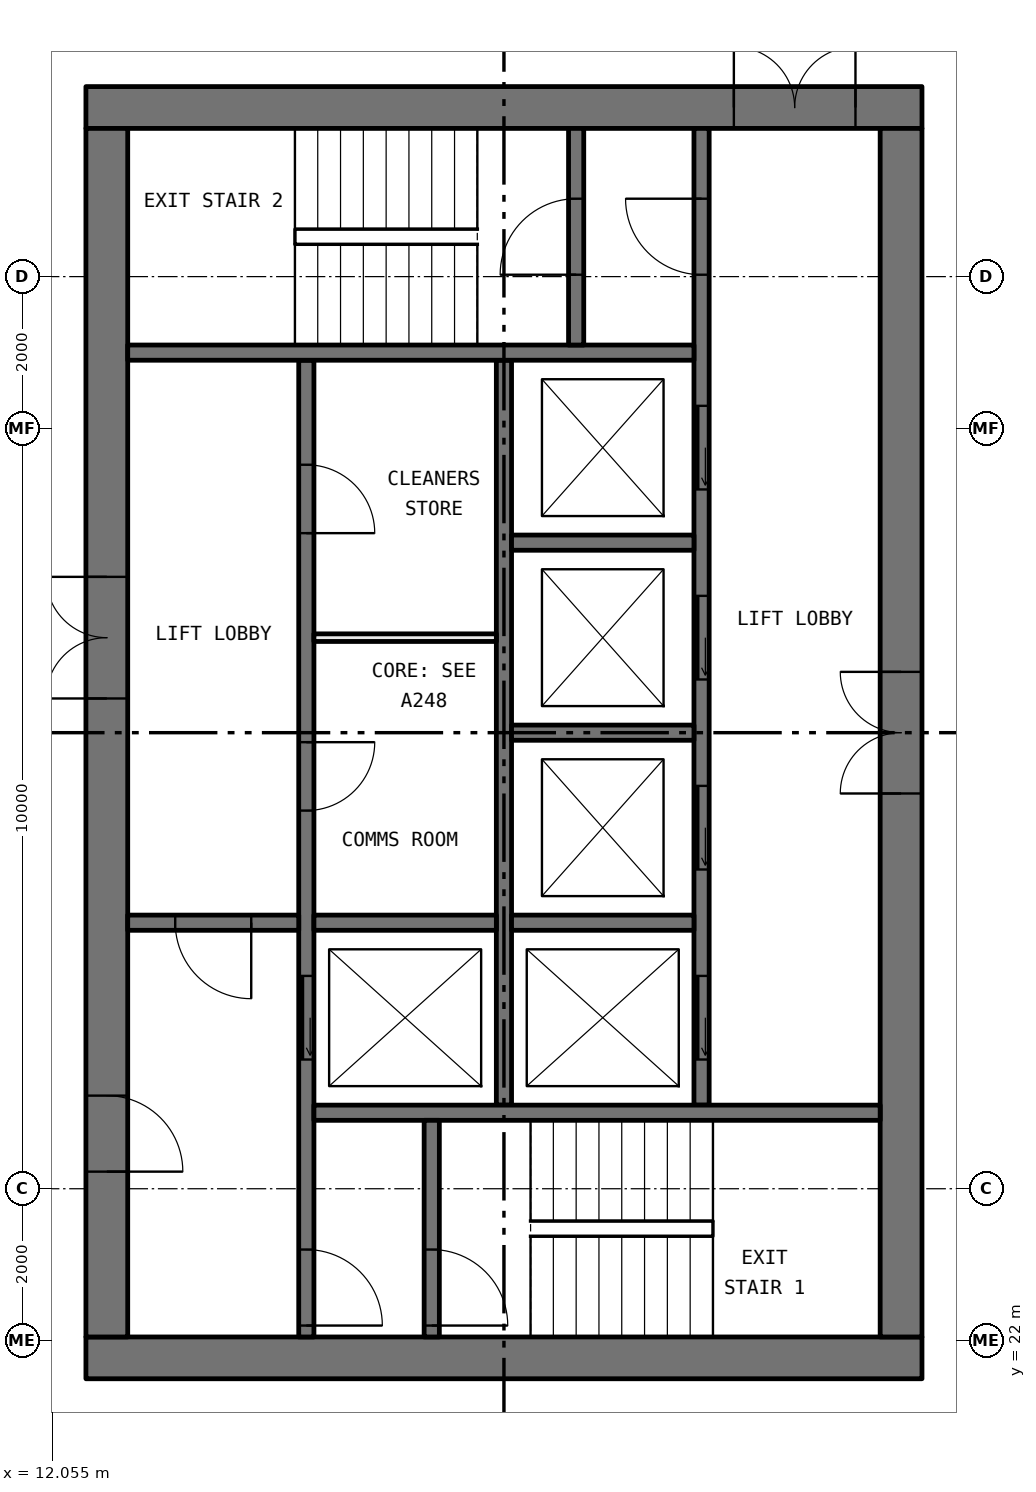
"""IFC4 building model, lengths in metres.
Left out: names, types, materials, properties, quantities, classifications, styles, units other than length and angle.
Written with IfcOpenShell. Run it as: python <this file> out.ifc"""

import sys

from ifc_helpers import new_model, si_unit, direction, frame, frame_2d, origin, place, context, subcontext, project, spatial, rectangle, extrude, element, fill, save


model = new_model("IFC4")
c1 = context("Model", 3, precision=1e-05, world=origin(), true_north=direction((0.0, 1.0)))
c2 = subcontext(c1, "Body", "Model", "MODEL_VIEW")
j1 = project(units=[si_unit("LENGTHUNIT", "METRE"), si_unit("PLANEANGLEUNIT", "RADIAN")], contexts=[c1])
p1 = place(None, origin())
s1 = spatial("IfcSite", under=j1, at=p1, CompositionType="ELEMENT")
p2 = place(p1, origin())
s2 = spatial("IfcBuilding", under=s1, at=p2, CompositionType="ELEMENT")
p3 = place(p2, frame((0.0, 0.0, 178.95)))
s3 = spatial("IfcBuildingStorey", under=s2, at=p3, CompositionType="ELEMENT", Elevation=178.95)
p4 = place(p3, frame((12.5, 21.775, 0.0), z_axis=(0.0, 0.0, 1.0), x_axis=(1.0, 0.0, 0.0)))
e1 = element("IfcWall", 1, at=p4, inside=s3, PredefinedType="SHEAR", context=c2, shape_type="SweptSolid", body=[
    extrude(rectangle(XDim=11.0, YDim=0.55, at=frame_2d((5.5, 0.0))), origin(), (0.0, 0.0, 1.0), 3.05),
])
p5 = place(p3, frame((12.5, 38.225, 0.0), z_axis=(0.0, 0.0, 1.0), x_axis=(1.0, 0.0, 0.0)))
e2 = element("IfcWall", 2, at=p5, inside=s3, PredefinedType="SHEAR", context=c2, shape_type="SweptSolid", body=[
    extrude(rectangle(XDim=11.0, YDim=0.55, at=frame_2d((5.5, 0.0))), origin(), (0.0, 0.0, 1.0), 3.05),
])
p6 = place(p5, frame((8.525, 0.0, 0.0)))
e3 = element("IfcOpeningElement", 3, at=p6, cuts=e2, PredefinedType="OPENING", context=c2, shape_type="SweptSolid", body=[
    extrude(rectangle(XDim=1.6, YDim=2.1, at=frame_2d((0.8, 1.05))), frame((0.0, 0.285, 0.0), z_axis=(0.0, -1.0, 0.0), x_axis=(1.0, 0.0, 0.0)), (0.0, 0.0, 1.0), 0.57),
])
p7 = place(p3, frame((12.775, 22.05, 0.0), z_axis=(0.0, 0.0, 1.0), x_axis=(0.0, 1.0, 0.0)))
e4 = element("IfcWall", 4, at=p7, inside=s3, PredefinedType="SHEAR", context=c2, shape_type="SweptSolid", body=[
    extrude(rectangle(XDim=15.9, YDim=0.55, at=frame_2d((7.95, 0.0))), origin(), (0.0, 0.0, 1.0), 3.05),
])
p8 = place(p7, frame((8.4, 0.0, 0.0)))
e5 = element("IfcOpeningElement", 5, at=p8, cuts=e4, PredefinedType="OPENING", context=c2, shape_type="SweptSolid", body=[
    extrude(rectangle(XDim=1.6, YDim=2.1, at=frame_2d((0.8, 1.05))), frame((0.0, 0.285, 0.0), z_axis=(0.0, -1.0, 0.0), x_axis=(1.0, 0.0, 0.0)), (0.0, 0.0, 1.0), 0.57),
])
p9 = place(p7, frame((2.175, 0.0, 0.0)))
e6 = element("IfcOpeningElement", 6, at=p9, cuts=e4, PredefinedType="OPENING", context=c2, shape_type="SweptSolid", body=[
    extrude(rectangle(XDim=1.0, YDim=2.1, at=frame_2d((0.5, 1.05))), frame((0.0, 0.285, 0.0), z_axis=(0.0, -1.0, 0.0), x_axis=(1.0, 0.0, 0.0)), (0.0, 0.0, 1.0), 0.57),
])
p10 = place(p3, frame((23.225, 22.05, 0.0), z_axis=(0.0, 0.0, 1.0), x_axis=(0.0, 1.0, 0.0)))
e7 = element("IfcWall", 7, at=p10, inside=s3, PredefinedType="SHEAR", context=c2, shape_type="SweptSolid", body=[
    extrude(rectangle(XDim=15.9, YDim=0.55, at=frame_2d((7.95, 0.0))), origin(), (0.0, 0.0, 1.0), 3.05),
])
p11 = place(p10, frame((7.15, 0.0, 0.0)))
e8 = element("IfcOpeningElement", 8, at=p11, cuts=e7, PredefinedType="OPENING", context=c2, shape_type="SweptSolid", body=[
    extrude(rectangle(XDim=1.6, YDim=2.1, at=frame_2d((0.8, 1.05))), frame((0.0, 0.285, 0.0), z_axis=(0.0, -1.0, 0.0), x_axis=(1.0, 0.0, 0.0)), (0.0, 0.0, 1.0), 0.57),
])
p12 = place(p3, frame((15.4, 22.05, 0.0), z_axis=(0.0, 0.0, 1.0), x_axis=(0.0, 1.0, 0.0)))
e9 = element("IfcWall", 9, at=p12, inside=s3, PredefinedType="SOLIDWALL", context=c2, shape_type="SweptSolid", body=[
    extrude(rectangle(XDim=12.85, YDim=0.2, at=frame_2d((6.425, 0.0))), origin(), (0.0, 0.0, 1.0), 3.05),
])
p13 = place(p12, frame((3.65, 0.0, 0.0)))
e10 = element("IfcOpeningElement", 10, at=p13, cuts=e9, PredefinedType="OPENING", context=c2, shape_type="SweptSolid", body=[
    extrude(rectangle(XDim=1.1, YDim=2.1, at=frame_2d((0.55, 1.05))), frame((0.0, 0.11, 0.0), z_axis=(0.0, -1.0, 0.0), x_axis=(1.0, 0.0, 0.0)), (0.0, 0.0, 1.0), 0.22),
])
p14 = place(p12, frame((0.15, 0.0, 0.0)))
e11 = element("IfcOpeningElement", 11, at=p14, cuts=e9, PredefinedType="OPENING", context=c2, shape_type="SweptSolid", body=[
    extrude(rectangle(XDim=1.0, YDim=2.1, at=frame_2d((0.5, 1.05))), frame((0.0, 0.11, 0.0), z_axis=(0.0, -1.0, 0.0), x_axis=(1.0, 0.0, 0.0)), (0.0, 0.0, 1.0), 0.22),
])
p15 = place(p12, frame((6.925, 0.0, 0.0)))
e12 = element("IfcOpeningElement", 12, at=p15, cuts=e9, PredefinedType="OPENING", context=c2, shape_type="SweptSolid", body=[
    extrude(rectangle(XDim=0.9, YDim=2.1, at=frame_2d((0.45, 1.05))), frame((0.0, 0.11, 0.0), z_axis=(0.0, -1.0, 0.0), x_axis=(1.0, 0.0, 0.0)), (0.0, 0.0, 1.0), 0.22),
])
p16 = place(p12, frame((10.575, 0.0, 0.0)))
e13 = element("IfcOpeningElement", 13, at=p16, cuts=e9, PredefinedType="OPENING", context=c2, shape_type="SweptSolid", body=[
    extrude(rectangle(XDim=0.9, YDim=2.1, at=frame_2d((0.45, 1.05))), frame((0.0, 0.11, 0.0), z_axis=(0.0, -1.0, 0.0), x_axis=(1.0, 0.0, 0.0)), (0.0, 0.0, 1.0), 0.22),
])
p17 = place(p3, frame((20.6, 25.1, 0.0), z_axis=(0.0, 0.0, 1.0), x_axis=(0.0, 1.0, 0.0)))
e14 = element("IfcWall", 14, at=p17, inside=s3, PredefinedType="SOLIDWALL", context=c2, shape_type="SweptSolid", body=[
    extrude(rectangle(XDim=12.85, YDim=0.2, at=frame_2d((6.425, 0.0))), origin(), (0.0, 0.0, 1.0), 3.05),
])
p18 = place(p17, frame((0.6, 0.0, 0.0)))
e15 = element("IfcOpeningElement", 15, at=p18, cuts=e14, PredefinedType="OPENING", context=c2, shape_type="SweptSolid", body=[
    extrude(rectangle(XDim=1.1, YDim=2.1, at=frame_2d((0.55, 1.05))), frame((0.0, 0.11, 0.0), z_axis=(0.0, -1.0, 0.0), x_axis=(1.0, 0.0, 0.0)), (0.0, 0.0, 1.0), 0.22),
])
p19 = place(p17, frame((3.1, 0.0, 0.0)))
e16 = element("IfcOpeningElement", 16, at=p19, cuts=e14, PredefinedType="OPENING", context=c2, shape_type="SweptSolid", body=[
    extrude(rectangle(XDim=1.1, YDim=2.1, at=frame_2d((0.55, 1.05))), frame((0.0, 0.11, 0.0), z_axis=(0.0, -1.0, 0.0), x_axis=(1.0, 0.0, 0.0)), (0.0, 0.0, 1.0), 0.22),
])
p20 = place(p17, frame((5.6, 0.0, 0.0)))
e17 = element("IfcOpeningElement", 17, at=p20, cuts=e14, PredefinedType="OPENING", context=c2, shape_type="SweptSolid", body=[
    extrude(rectangle(XDim=1.1, YDim=2.1, at=frame_2d((0.55, 1.05))), frame((0.0, 0.11, 0.0), z_axis=(0.0, -1.0, 0.0), x_axis=(1.0, 0.0, 0.0)), (0.0, 0.0, 1.0), 0.22),
])
p21 = place(p17, frame((8.1, 0.0, 0.0)))
e18 = element("IfcOpeningElement", 18, at=p21, cuts=e14, PredefinedType="OPENING", context=c2, shape_type="SweptSolid", body=[
    extrude(rectangle(XDim=1.1, YDim=2.1, at=frame_2d((0.55, 1.05))), frame((0.0, 0.11, 0.0), z_axis=(0.0, -1.0, 0.0), x_axis=(1.0, 0.0, 0.0)), (0.0, 0.0, 1.0), 0.22),
])
p22 = place(p17, frame((10.925, 0.0, 0.0)))
e19 = element("IfcOpeningElement", 19, at=p22, cuts=e14, PredefinedType="OPENING", context=c2, shape_type="SweptSolid", body=[
    extrude(rectangle(XDim=1.0, YDim=2.1, at=frame_2d((0.5, 1.05))), frame((0.0, 0.11, 0.0), z_axis=(0.0, -1.0, 0.0), x_axis=(1.0, 0.0, 0.0)), (0.0, 0.0, 1.0), 0.22),
])
p23 = place(p3, frame((18.0, 25.1, 0.0), z_axis=(0.0, 0.0, 1.0), x_axis=(0.0, 1.0, 0.0)))
e20 = element("IfcWall", 20, at=p23, inside=s3, PredefinedType="SOLIDWALL", context=c2, shape_type="SweptSolid", body=[
    extrude(rectangle(XDim=9.8, YDim=0.2, at=frame_2d((4.9, 0.0))), origin(), (0.0, 0.0, 1.0), 3.05),
])
for number, where, z_axis, x_axis in (
    (21, (15.5, 25.0, 0.0), (0.0, 0.0, 1.0), (1.0, 0.0, 0.0)),
    (22, (13.05, 35.0, 0.0), (0.0, 0.0, 1.0), (1.0, 0.0, 0.0)),
):
    element("IfcWall", number, at=place(p3, frame(where, z_axis=z_axis, x_axis=x_axis)), inside=s3, PredefinedType="SOLIDWALL", context=c2, shape_type="SweptSolid", body=[
        extrude(rectangle(XDim=7.45, YDim=0.2, at=frame_2d((3.725, 0.0))), origin(), (0.0, 0.0, 1.0), 3.05),
    ])
p24 = place(p3, frame((13.05, 27.5, 0.0), z_axis=(0.0, 0.0, 1.0), x_axis=(1.0, 0.0, 0.0)))
e23 = element("IfcWall", 23, at=p24, inside=s3, PredefinedType="SOLIDWALL", context=c2, shape_type="SweptSolid", body=[
    extrude(rectangle(XDim=2.25, YDim=0.2, at=frame_2d((1.125, 0.0))), origin(), (0.0, 0.0, 1.0), 3.05),
])
p25 = place(p24, frame((0.625, 0.0, 0.0)))
e24 = element("IfcOpeningElement", 24, at=p25, cuts=e23, PredefinedType="OPENING", context=c2, shape_type="SweptSolid", body=[
    extrude(rectangle(XDim=1.0, YDim=2.1, at=frame_2d((0.5, 1.05))), frame((0.0, 0.11, 0.0), z_axis=(0.0, -1.0, 0.0), x_axis=(1.0, 0.0, 0.0)), (0.0, 0.0, 1.0), 0.22),
])
p26 = place(p3, frame((17.05, 22.05, 0.0), z_axis=(0.0, 0.0, 1.0), x_axis=(0.0, 1.0, 0.0)))
e25 = element("IfcWall", 25, at=p26, inside=s3, PredefinedType="SOLIDWALL", context=c2, shape_type="SweptSolid", body=[
    extrude(rectangle(XDim=2.85, YDim=0.2, at=frame_2d((1.425, 0.0))), origin(), (0.0, 0.0, 1.0), 3.05),
])
p27 = place(p26, frame((0.15, 0.0, 0.0)))
e26 = element("IfcOpeningElement", 26, at=p27, cuts=e25, PredefinedType="OPENING", context=c2, shape_type="SweptSolid", body=[
    extrude(rectangle(XDim=1.0, YDim=2.1, at=frame_2d((0.5, 1.05))), frame((0.0, 0.11, 0.0), z_axis=(0.0, -1.0, 0.0), x_axis=(1.0, 0.0, 0.0)), (0.0, 0.0, 1.0), 0.22),
])
p28 = place(p3, frame((18.95, 35.1, 0.0), z_axis=(0.0, 0.0, 1.0), x_axis=(0.0, 1.0, 0.0)))
e27 = element("IfcWall", 27, at=p28, inside=s3, PredefinedType="SOLIDWALL", context=c2, shape_type="SweptSolid", body=[
    extrude(rectangle(XDim=2.85, YDim=0.2, at=frame_2d((1.425, 0.0))), origin(), (0.0, 0.0, 1.0), 3.05),
])
p29 = place(p28, frame((0.925, 0.0, 0.0)))
e28 = element("IfcOpeningElement", 28, at=p29, cuts=e27, PredefinedType="OPENING", context=c2, shape_type="SweptSolid", body=[
    extrude(rectangle(XDim=1.0, YDim=2.1, at=frame_2d((0.5, 1.05))), frame((0.0, 0.11, 0.0), z_axis=(0.0, -1.0, 0.0), x_axis=(1.0, 0.0, 0.0)), (0.0, 0.0, 1.0), 0.22),
])
for number, where, z_axis, x_axis in (
    (29, (15.5, 27.5, 0.0), (0.0, 0.0, 1.0), (1.0, 0.0, 0.0)),
    (30, (18.1, 27.5, 0.0), (0.0, 0.0, 1.0), (1.0, 0.0, 0.0)),
    (31, (18.1, 30.0, 0.0), (0.0, 0.0, 1.0), (1.0, 0.0, 0.0)),
    (32, (18.1, 32.5, 0.0), (0.0, 0.0, 1.0), (1.0, 0.0, 0.0)),
):
    element("IfcWall", number, at=place(p3, frame(where, z_axis=z_axis, x_axis=x_axis)), inside=s3, PredefinedType="SOLIDWALL", context=c2, shape_type="SweptSolid", body=[
        extrude(rectangle(XDim=2.4, YDim=0.2, at=frame_2d((1.2, 0.0))), origin(), (0.0, 0.0, 1.0), 3.05),
    ])
p30 = place(p3, frame((15.5, 31.25, 0.0), z_axis=(0.0, 0.0, 1.0), x_axis=(1.0, 0.0, 0.0)))
e33 = element("IfcWall", 33, at=p30, inside=s3, PredefinedType="PARTITIONING", context=c2, shape_type="SweptSolid", body=[
    extrude(rectangle(XDim=2.4, YDim=0.1, at=frame_2d((1.2, 0.0))), origin(), (0.0, 0.0, 1.0), 3.05),
])
p31 = place(p18, origin())
e34 = element("IfcDoor", 34, at=p31, inside=s3, OperationType="SLIDING_TO_LEFT", PredefinedType="DOOR", context=c2, shape_type="SweptSolid", body=[
    extrude(rectangle(XDim=1.1, YDim=2.1, at=frame_2d((0.55, 1.05))), frame((0.0, 0.025, 0.0), z_axis=(0.0, -1.0, 0.0), x_axis=(1.0, 0.0, 0.0)), (0.0, 0.0, 1.0), 0.05),
])
fill(e15, e34)
p32 = place(p19, origin())
e35 = element("IfcDoor", 35, at=p32, inside=s3, OperationType="SLIDING_TO_LEFT", PredefinedType="DOOR", context=c2, shape_type="SweptSolid", body=[
    extrude(rectangle(XDim=1.1, YDim=2.1, at=frame_2d((0.55, 1.05))), frame((0.0, 0.025, 0.0), z_axis=(0.0, -1.0, 0.0), x_axis=(1.0, 0.0, 0.0)), (0.0, 0.0, 1.0), 0.05),
])
fill(e16, e35)
p33 = place(p20, origin())
e36 = element("IfcDoor", 36, at=p33, inside=s3, OperationType="SLIDING_TO_LEFT", PredefinedType="DOOR", context=c2, shape_type="SweptSolid", body=[
    extrude(rectangle(XDim=1.1, YDim=2.1, at=frame_2d((0.55, 1.05))), frame((0.0, 0.025, 0.0), z_axis=(0.0, -1.0, 0.0), x_axis=(1.0, 0.0, 0.0)), (0.0, 0.0, 1.0), 0.05),
])
fill(e17, e36)
p34 = place(p21, origin())
e37 = element("IfcDoor", 37, at=p34, inside=s3, OperationType="SLIDING_TO_LEFT", PredefinedType="DOOR", context=c2, shape_type="SweptSolid", body=[
    extrude(rectangle(XDim=1.1, YDim=2.1, at=frame_2d((0.55, 1.05))), frame((0.0, 0.025, 0.0), z_axis=(0.0, -1.0, 0.0), x_axis=(1.0, 0.0, 0.0)), (0.0, 0.0, 1.0), 0.05),
])
fill(e18, e37)
p35 = place(p13, origin())
e38 = element("IfcDoor", 38, at=p35, inside=s3, OperationType="SLIDING_TO_LEFT", PredefinedType="DOOR", context=c2, shape_type="SweptSolid", body=[
    extrude(rectangle(XDim=1.1, YDim=2.1, at=frame_2d((0.55, 1.05))), frame((0.0, 0.025, 0.0), z_axis=(0.0, -1.0, 0.0), x_axis=(1.0, 0.0, 0.0)), (0.0, 0.0, 1.0), 0.05),
])
fill(e10, e38)
p36 = place(p27, frame((1.0, 0.0, 0.0), x_axis=(-1.0, 0.0, 0.0)))
e39 = element("IfcDoor", 39, at=p36, inside=s3, OperationType="SINGLE_SWING_LEFT", PredefinedType="DOOR", context=c2, shape_type="SweptSolid", body=[
    extrude(rectangle(XDim=1.0, YDim=2.1, at=frame_2d((0.5, 1.05))), frame((0.0, 0.025, 0.0), z_axis=(0.0, -1.0, 0.0), x_axis=(1.0, 0.0, 0.0)), (0.0, 0.0, 1.0), 0.05),
])
fill(e26, e39)
p37 = place(p14, frame((1.0, 0.0, 0.0), x_axis=(-1.0, 0.0, 0.0)))
e40 = element("IfcDoor", 40, at=p37, inside=s3, OperationType="SINGLE_SWING_LEFT", PredefinedType="DOOR", context=c2, shape_type="SweptSolid", body=[
    extrude(rectangle(XDim=1.0, YDim=2.1, at=frame_2d((0.5, 1.05))), frame((0.0, 0.025, 0.0), z_axis=(0.0, -1.0, 0.0), x_axis=(1.0, 0.0, 0.0)), (0.0, 0.0, 1.0), 0.05),
])
fill(e11, e40)
p38 = place(p22, origin())
e41 = element("IfcDoor", 41, at=p38, inside=s3, OperationType="SINGLE_SWING_LEFT", PredefinedType="DOOR", context=c2, shape_type="SweptSolid", body=[
    extrude(rectangle(XDim=1.0, YDim=2.1, at=frame_2d((0.5, 1.05))), frame((0.0, 0.025, 0.0), z_axis=(0.0, -1.0, 0.0), x_axis=(1.0, 0.0, 0.0)), (0.0, 0.0, 1.0), 0.05),
])
fill(e19, e41)
p39 = place(p29, origin())
e42 = element("IfcDoor", 42, at=p39, inside=s3, OperationType="SINGLE_SWING_RIGHT", PredefinedType="DOOR", context=c2, shape_type="SweptSolid", body=[
    extrude(rectangle(XDim=1.0, YDim=2.1, at=frame_2d((0.5, 1.05))), frame((0.0, 0.025, 0.0), z_axis=(0.0, -1.0, 0.0), x_axis=(1.0, 0.0, 0.0)), (0.0, 0.0, 1.0), 0.05),
])
fill(e28, e42)
p40 = place(p25, frame((1.0, 0.0, 0.0), x_axis=(-1.0, 0.0, 0.0)))
e43 = element("IfcDoor", 43, at=p40, inside=s3, OperationType="SINGLE_SWING_RIGHT", PredefinedType="DOOR", context=c2, shape_type="SweptSolid", body=[
    extrude(rectangle(XDim=1.0, YDim=2.1, at=frame_2d((0.5, 1.05))), frame((0.0, 0.025, 0.0), z_axis=(0.0, -1.0, 0.0), x_axis=(1.0, 0.0, 0.0)), (0.0, 0.0, 1.0), 0.05),
])
fill(e24, e43)
p41 = place(p8, origin())
e44 = element("IfcDoor", 44, at=p41, inside=s3, OperationType="DOUBLE_DOOR_SINGLE_SWING", PredefinedType="DOOR", context=c2, shape_type="SweptSolid", body=[
    extrude(rectangle(XDim=1.6, YDim=2.1, at=frame_2d((0.8, 1.05))), frame((0.0, 0.025, 0.0), z_axis=(0.0, -1.0, 0.0), x_axis=(1.0, 0.0, 0.0)), (0.0, 0.0, 1.0), 0.05),
])
fill(e5, e44)
p42 = place(p9, frame((1.0, 0.0, 0.0), x_axis=(-1.0, 0.0, 0.0)))
e45 = element("IfcDoor", 45, at=p42, inside=s3, OperationType="SINGLE_SWING_LEFT", PredefinedType="DOOR", context=c2, shape_type="SweptSolid", body=[
    extrude(rectangle(XDim=1.0, YDim=2.1, at=frame_2d((0.5, 1.05))), frame((0.0, 0.025, 0.0), z_axis=(0.0, -1.0, 0.0), x_axis=(1.0, 0.0, 0.0)), (0.0, 0.0, 1.0), 0.05),
])
fill(e6, e45)
p43 = place(p6, origin())
e46 = element("IfcDoor", 46, at=p43, inside=s3, OperationType="DOUBLE_DOOR_SINGLE_SWING", PredefinedType="DOOR", context=c2, shape_type="SweptSolid", body=[
    extrude(rectangle(XDim=1.6, YDim=2.1, at=frame_2d((0.8, 1.05))), frame((0.0, 0.025, 0.0), z_axis=(0.0, -1.0, 0.0), x_axis=(1.0, 0.0, 0.0)), (0.0, 0.0, 1.0), 0.05),
])
fill(e3, e46)
p44 = place(p11, origin())
e47 = element("IfcDoor", 47, at=p44, inside=s3, OperationType="DOUBLE_DOOR_SINGLE_SWING", PredefinedType="DOOR", context=c2, shape_type="SweptSolid", body=[
    extrude(rectangle(XDim=1.6, YDim=2.1, at=frame_2d((0.8, 1.05))), frame((0.0, 0.025, 0.0), z_axis=(0.0, -1.0, 0.0), x_axis=(1.0, 0.0, 0.0)), (0.0, 0.0, 1.0), 0.05),
])
fill(e8, e47)
p45 = place(p15, frame((0.9, 0.0, 0.0), x_axis=(-1.0, 0.0, 0.0)))
e48 = element("IfcDoor", 48, at=p45, inside=s3, OperationType="SINGLE_SWING_RIGHT", PredefinedType="DOOR", context=c2, shape_type="SweptSolid", body=[
    extrude(rectangle(XDim=0.9, YDim=2.1, at=frame_2d((0.45, 1.05))), frame((0.0, 0.025, 0.0), z_axis=(0.0, -1.0, 0.0), x_axis=(1.0, 0.0, 0.0)), (0.0, 0.0, 1.0), 0.05),
])
fill(e12, e48)
p46 = place(p16, frame((0.9, 0.0, 0.0), x_axis=(-1.0, 0.0, 0.0)))
e49 = element("IfcDoor", 49, at=p46, inside=s3, OperationType="SINGLE_SWING_LEFT", PredefinedType="DOOR", context=c2, shape_type="SweptSolid", body=[
    extrude(rectangle(XDim=0.9, YDim=2.1, at=frame_2d((0.45, 1.05))), frame((0.0, 0.025, 0.0), z_axis=(0.0, -1.0, 0.0), x_axis=(1.0, 0.0, 0.0)), (0.0, 0.0, 1.0), 0.05),
])
fill(e13, e49)
save(model, sys.argv[1])
